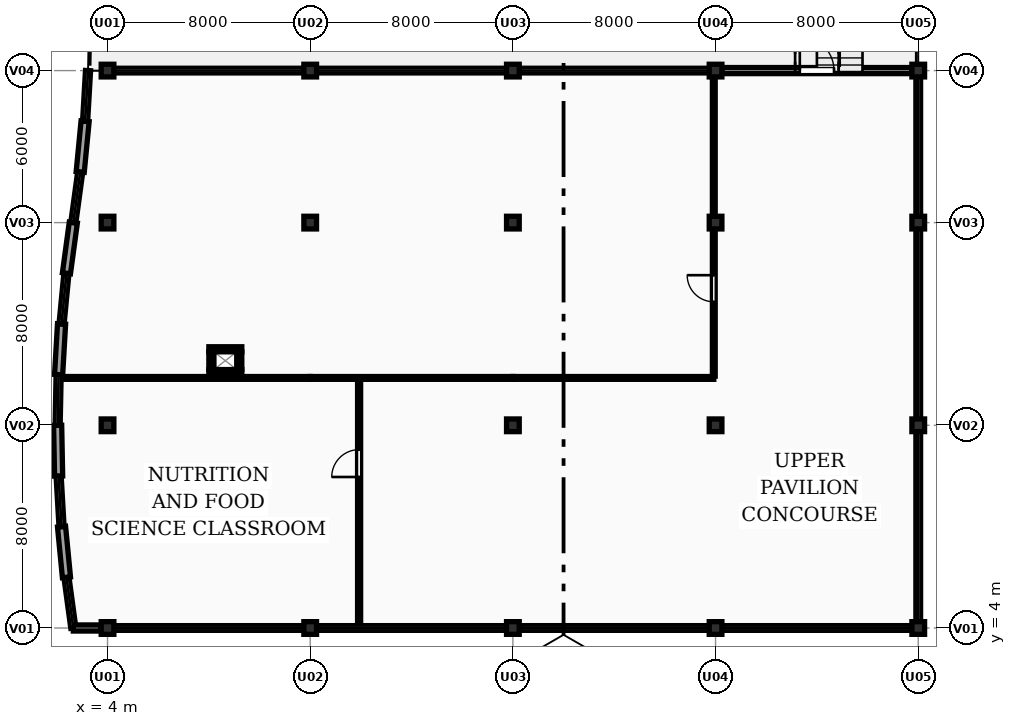
"""IFC4 building model, lengths in metres.
Left out: names, types, materials, properties, quantities, classifications, styles, units other than length and angle.
Written with IfcOpenShell. Run it as: python <this file> out.ifc"""

import sys

from ifc_helpers import new_model, si_unit, direction, frame, frame_2d, origin, origin_2d, place, context, subcontext, project, spatial, rectangle, extrude, element, fill, save


model = new_model("IFC4")
c1 = context("Model", 3, precision=1e-05, world=origin(), true_north=direction((0.0, 1.0)))
c2 = subcontext(c1, "Body", "Model", "MODEL_VIEW")
j1 = project(units=[si_unit("LENGTHUNIT", "METRE"), si_unit("PLANEANGLEUNIT", "RADIAN")], contexts=[c1])
p1 = place(None, origin())
s1 = spatial("IfcSite", under=j1, at=p1, CompositionType="ELEMENT")
p2 = place(p1, origin())
s2 = spatial("IfcBuilding", under=s1, at=p2, CompositionType="ELEMENT")
p3 = place(p2, frame((0.0, 0.0, 4.5)))
s3 = spatial("IfcBuildingStorey", under=s2, at=p3, CompositionType="ELEMENT", Elevation=4.5)
for number, where, z_axis, x_axis in (
    (1, (4.0, 4.0, 0.0), (0.0, 0.0, 1.0), (1.0, 0.0, 0.0)),
    (2, (4.0, 12.0, 0.0), (0.0, 0.0, 1.0), (1.0, 0.0, 0.0)),
    (3, (4.0, 20.0, 0.0), (0.0, 0.0, 1.0), (1.0, 0.0, 0.0)),
    (4, (4.0, 26.0, 0.0), (0.0, 0.0, 1.0), (1.0, 0.0, 0.0)),
    (5, (12.0, 4.0, 0.0), (0.0, 0.0, 1.0), (1.0, 0.0, 0.0)),
    (6, (12.0, 20.0, 0.0), (0.0, 0.0, 1.0), (1.0, 0.0, 0.0)),
    (7, (12.0, 26.0, 0.0), (0.0, 0.0, 1.0), (1.0, 0.0, 0.0)),
    (8, (20.0, 4.0, 0.0), (0.0, 0.0, 1.0), (1.0, 0.0, 0.0)),
    (9, (20.0, 12.0, 0.0), (0.0, 0.0, 1.0), (1.0, 0.0, 0.0)),
    (10, (20.0, 20.0, 0.0), (0.0, 0.0, 1.0), (1.0, 0.0, 0.0)),
    (11, (20.0, 26.0, 0.0), (0.0, 0.0, 1.0), (1.0, 0.0, 0.0)),
    (12, (28.0, 4.0, 0.0), (0.0, 0.0, 1.0), (1.0, 0.0, 0.0)),
    (13, (28.0, 12.0, 0.0), (0.0, 0.0, 1.0), (1.0, 0.0, 0.0)),
    (14, (28.0, 20.0, 0.0), (0.0, 0.0, 1.0), (1.0, 0.0, 0.0)),
    (15, (28.0, 26.0, 0.0), (0.0, 0.0, 1.0), (1.0, 0.0, 0.0)),
    (16, (36.0, 4.0, 0.0), (0.0, 0.0, 1.0), (1.0, 0.0, 0.0)),
    (17, (36.0, 12.0, 0.0), (0.0, 0.0, 1.0), (1.0, 0.0, 0.0)),
    (18, (36.0, 20.0, 0.0), (0.0, 0.0, 1.0), (1.0, 0.0, 0.0)),
    (19, (36.0, 26.0, 0.0), (0.0, 0.0, 1.0), (1.0, 0.0, 0.0)),
):
    element("IfcColumn", number, at=place(p3, frame(where, z_axis=z_axis, x_axis=x_axis)), inside=s3, PredefinedType="COLUMN", context=c2, shape_type="SweptSolid", body=[
        extrude(rectangle(XDim=0.5, YDim=0.5, at=origin_2d()), origin(), (0.0, 0.0, 1.0), 3.9),
    ])
p4 = place(p3, frame((2.65, 4.0, 0.0), z_axis=(0.0, 0.0, 1.0), x_axis=(-0.134627389588, 0.990896294257, 0.0)))
e20 = element("IfcWall", 20, at=p4, inside=s3, PredefinedType="SOLIDWALL", context=c2, shape_type="SweptSolid", body=[
    extrude(rectangle(XDim=2.018, YDim=0.2, at=frame_2d((1.009, 0.0))), origin(), (0.0, 0.0, 1.0), 0.95),
])
p5 = place(p3, frame((2.378, 6.0, 0.0), z_axis=(0.0, 0.0, 1.0), x_axis=(-0.096110619057, 0.995370659053, 0.0)))
e21 = element("IfcWall", 21, at=p5, inside=s3, PredefinedType="SOLIDWALL", context=c2, shape_type="SweptSolid", body=[
    extrude(rectangle(XDim=2.009, YDim=0.32, at=frame_2d((1.005, 0.0))), origin(), (0.0, 0.0, 1.0), 3.65),
])
p6 = place(p3, frame((2.185, 8.0, 0.0), z_axis=(0.0, 0.0, 1.0), x_axis=(-0.05776471272, 0.998330224908, 0.0)))
e22 = element("IfcWall", 22, at=p6, inside=s3, PredefinedType="SOLIDWALL", context=c2, shape_type="SweptSolid", body=[
    extrude(rectangle(XDim=2.003, YDim=0.2, at=frame_2d((1.002, 0.0))), origin(), (0.0, 0.0, 1.0), 0.95),
])
p7 = place(p3, frame((2.069, 10.0, 0.0), z_axis=(0.0, 0.0, 1.0), x_axis=(-0.019161520385, 0.999816401214, 0.0)))
e23 = element("IfcWall", 23, at=p7, inside=s3, PredefinedType="SOLIDWALL", context=c2, shape_type="SweptSolid", body=[
    extrude(rectangle(XDim=2.0, YDim=0.32, at=frame_2d((1.0, 0.0))), origin(), (0.0, 0.0, 1.0), 3.65),
])
p8 = place(p3, frame((2.031, 12.0, 0.0), z_axis=(0.0, 0.0, 1.0), x_axis=(0.019161520385, 0.999816401214, 0.0)))
e24 = element("IfcWall", 24, at=p8, inside=s3, PredefinedType="SOLIDWALL", context=c2, shape_type="SweptSolid", body=[
    extrude(rectangle(XDim=2.0, YDim=0.2, at=frame_2d((1.0, 0.0))), origin(), (0.0, 0.0, 1.0), 0.95),
])
p9 = place(p3, frame((2.069, 14.0, 0.0), z_axis=(0.0, 0.0, 1.0), x_axis=(0.05776471272, 0.998330224908, 0.0)))
e25 = element("IfcWall", 25, at=p9, inside=s3, PredefinedType="SOLIDWALL", context=c2, shape_type="SweptSolid", body=[
    extrude(rectangle(XDim=2.003, YDim=0.32, at=frame_2d((1.002, 0.0))), origin(), (0.0, 0.0, 1.0), 3.65),
])
p10 = place(p3, frame((2.185, 16.0, 0.0), z_axis=(0.0, 0.0, 1.0), x_axis=(0.096110619057, 0.995370659053, 0.0)))
e26 = element("IfcWall", 26, at=p10, inside=s3, PredefinedType="SOLIDWALL", context=c2, shape_type="SweptSolid", body=[
    extrude(rectangle(XDim=2.009, YDim=0.2, at=frame_2d((1.005, 0.0))), origin(), (0.0, 0.0, 1.0), 0.95),
])
p11 = place(p3, frame((2.378, 18.0, 0.0), z_axis=(0.0, 0.0, 1.0), x_axis=(0.134627389588, 0.990896294257, 0.0)))
e27 = element("IfcWall", 27, at=p11, inside=s3, PredefinedType="SOLIDWALL", context=c2, shape_type="SweptSolid", body=[
    extrude(rectangle(XDim=2.018, YDim=0.32, at=frame_2d((1.009, 0.0))), origin(), (0.0, 0.0, 1.0), 3.65),
])
p12 = place(p3, frame((2.65, 20.0, 0.0), z_axis=(0.0, 0.0, 1.0), x_axis=(0.134746153381, 0.990880151254, 0.0)))
e28 = element("IfcWall", 28, at=p12, inside=s3, PredefinedType="SOLIDWALL", context=c2, shape_type="SweptSolid", body=[
    extrude(rectangle(XDim=2.018, YDim=0.2, at=frame_2d((1.009, 0.0))), origin(), (0.0, 0.0, 1.0), 0.95),
])
p13 = place(p3, frame((2.922, 22.0, 0.0), z_axis=(0.0, 0.0, 1.0), x_axis=(0.096110619057, 0.995370659053, 0.0)))
e29 = element("IfcWall", 29, at=p13, inside=s3, PredefinedType="SOLIDWALL", context=c2, shape_type="SweptSolid", body=[
    extrude(rectangle(XDim=2.009, YDim=0.32, at=frame_2d((1.005, 0.0))), origin(), (0.0, 0.0, 1.0), 3.65),
])
p14 = place(p3, frame((3.115, 24.0, 0.0), z_axis=(0.0, 0.0, 1.0), x_axis=(0.05776471272, 0.998330224908, 0.0)))
e30 = element("IfcWall", 30, at=p14, inside=s3, PredefinedType="SOLIDWALL", context=c2, shape_type="SweptSolid", body=[
    extrude(rectangle(XDim=2.003, YDim=0.2, at=frame_2d((1.002, 0.0))), origin(), (0.0, 0.0, 1.0), 0.95),
])
for number, where, z_axis, x_axis in (
    (31, (35.75, 4.0, 0.0), (0.0, 0.0, 1.0), (-1.0, 0.0, 0.0)),
    (32, (27.75, 4.0, 0.0), (0.0, 0.0, 1.0), (-1.0, 0.0, 0.0)),
    (33, (19.75, 4.0, 0.0), (0.0, 0.0, 1.0), (-1.0, 0.0, 0.0)),
    (34, (11.75, 4.0, 0.0), (0.0, 0.0, 1.0), (-1.0, 0.0, 0.0)),
):
    element("IfcWall", number, at=place(p3, frame(where, z_axis=z_axis, x_axis=x_axis)), inside=s3, PredefinedType="SOLIDWALL", context=c2, shape_type="SweptSolid", body=[
        extrude(rectangle(XDim=7.5, YDim=0.185, at=frame_2d((3.75, 0.0))), origin(), (0.0, 0.0, 1.0), 0.95),
    ])
p15 = place(p3, frame((3.75, 4.0, 0.0), z_axis=(0.0, 0.0, 1.0), x_axis=(-1.0, 0.0, 0.0)))
e35 = element("IfcWall", 35, at=p15, inside=s3, PredefinedType="SOLIDWALL", context=c2, shape_type="SweptSolid", body=[
    extrude(rectangle(XDim=1.1, YDim=0.24, at=frame_2d((0.55, 0.0))), origin(), (0.0, 0.0, 1.0), 3.0),
])
p16 = place(p3, frame((36.0, 25.75, 0.0), z_axis=(0.0, 0.0, 1.0), x_axis=(0.0, -1.0, 0.0)))
e36 = element("IfcWall", 36, at=p16, inside=s3, PredefinedType="SOLIDWALL", context=c2, shape_type="SweptSolid", body=[
    extrude(rectangle(XDim=5.5, YDim=0.185, at=frame_2d((2.75, 0.0))), origin(), (0.0, 0.0, 1.0), 0.95),
])
for number, where, z_axis, x_axis in (
    (37, (36.0, 19.75, 0.0), (0.0, 0.0, 1.0), (0.0, -1.0, 0.0)),
    (38, (36.0, 11.75, 0.0), (0.0, 0.0, 1.0), (0.0, -1.0, 0.0)),
    (39, (4.25, 26.0, 0.0), (0.0, 0.0, 1.0), (1.0, 0.0, 0.0)),
    (40, (12.25, 26.0, 0.0), (0.0, 0.0, 1.0), (1.0, 0.0, 0.0)),
    (41, (20.25, 26.0, 0.0), (0.0, 0.0, 1.0), (1.0, 0.0, 0.0)),
):
    element("IfcWall", number, at=place(p3, frame(where, z_axis=z_axis, x_axis=x_axis)), inside=s3, PredefinedType="SOLIDWALL", context=c2, shape_type="SweptSolid", body=[
        extrude(rectangle(XDim=7.5, YDim=0.185, at=frame_2d((3.75, 0.0))), origin(), (0.0, 0.0, 1.0), 0.95),
    ])
p17 = place(p3, frame((28.25, 26.0, 0.0), z_axis=(0.0, 0.0, 1.0), x_axis=(1.0, 0.0, 0.0)))
e42 = element("IfcWall", 42, at=p17, inside=s3, PredefinedType="SOLIDWALL", context=c2, shape_type="SweptSolid", body=[
    extrude(rectangle(XDim=7.5, YDim=0.24, at=frame_2d((3.75, 0.0))), origin(), (0.0, 0.0, 1.0), 3.65),
])
p18 = place(p17, frame((3.075, 0.0, 0.0)))
e43 = element("IfcOpeningElement", 43, at=p18, cuts=e42, PredefinedType="OPENING", context=c2, shape_type="SweptSolid", body=[
    extrude(rectangle(XDim=1.35, YDim=2.15, at=frame_2d((0.675, 1.075))), frame((0.0, 0.13, 0.0), z_axis=(0.0, -1.0, 0.0), x_axis=(1.0, 0.0, 0.0)), (0.0, 0.0, 1.0), 0.26),
])
for number, where, z_axis, x_axis in (
    (44, (9.3, 14.1, 0.0), (0.0, 0.0, 1.0), (-1.0, 0.0, 0.0)),
    (45, (8.0, 15.0, 0.0), (0.0, 0.0, 1.0), (1.0, 0.0, 0.0)),
):
    element("IfcWall", number, at=place(p3, frame(where, z_axis=z_axis, x_axis=x_axis)), inside=s3, PredefinedType="PARTITIONING", context=c2, shape_type="SweptSolid", body=[
        extrude(rectangle(XDim=1.3, YDim=0.2, at=frame_2d((0.65, 0.0))), origin(), (0.0, 0.0, 1.0), 3.65),
    ])
for number, where, z_axis, x_axis in (
    (46, (8.1, 14.2, 0.0), (0.0, 0.0, 1.0), (0.0, 1.0, 0.0)),
    (47, (9.2, 14.9, 0.0), (0.0, 0.0, 1.0), (0.0, -1.0, 0.0)),
):
    element("IfcWall", number, at=place(p3, frame(where, z_axis=z_axis, x_axis=x_axis)), inside=s3, PredefinedType="PARTITIONING", context=c2, shape_type="SweptSolid", body=[
        extrude(rectangle(XDim=0.7, YDim=0.2, at=frame_2d((0.35, 0.0))), origin(), (0.0, 0.0, 1.0), 3.65),
    ])
p19 = place(p3, frame((2.264, 13.87, 0.0), z_axis=(0.0, 0.0, 1.0), x_axis=(1.0, 0.0, 0.0)))
e48 = element("IfcWall", 48, at=p19, inside=s3, PredefinedType="PARTITIONING", context=c2, shape_type="SweptSolid", body=[
    extrude(rectangle(XDim=9.736, YDim=0.11, at=frame_2d((4.868, 0.0))), origin(), (0.0, 0.0, 1.0), 3.65),
])
p20 = place(p3, frame((12.0, 13.87, 0.0), z_axis=(0.0, 0.0, 1.0), x_axis=(1.0, 0.0, 0.0)))
e49 = element("IfcWall", 49, at=p20, inside=s3, PredefinedType="PARTITIONING", context=c2, shape_type="SweptSolid", body=[
    extrude(rectangle(XDim=8.0, YDim=0.11, at=frame_2d((4.0, 0.0))), origin(), (0.0, 0.0, 1.0), 3.65),
])
p21 = place(p3, frame((20.0, 13.87, 0.0), z_axis=(0.0, 0.0, 1.0), x_axis=(1.0, 0.0, 0.0)))
e50 = element("IfcWall", 50, at=p21, inside=s3, PredefinedType="PARTITIONING", context=c2, shape_type="SweptSolid", body=[
    extrude(rectangle(XDim=7.93, YDim=0.11, at=frame_2d((3.965, 0.0))), origin(), (0.0, 0.0, 1.0), 3.65),
])
p22 = place(p3, frame((27.93, 13.94, 0.0), z_axis=(0.0, 0.0, 1.0), x_axis=(0.0, 1.0, 0.0)))
e51 = element("IfcWall", 51, at=p22, inside=s3, PredefinedType="PARTITIONING", context=c2, shape_type="SweptSolid", body=[
    extrude(rectangle(XDim=11.79, YDim=0.11, at=frame_2d((5.895, 0.0))), origin(), (0.0, 0.0, 1.0), 2.998),
])
p23 = place(p22, frame((2.935, 0.0, 0.0)))
e52 = element("IfcOpeningElement", 52, at=p23, cuts=e51, PredefinedType="OPENING", context=c2, shape_type="SweptSolid", body=[
    extrude(rectangle(XDim=1.05, YDim=2.1, at=frame_2d((0.525, 1.05))), frame((0.0, 0.065, 0.0), z_axis=(0.0, -1.0, 0.0), x_axis=(1.0, 0.0, 0.0)), (0.0, 0.0, 1.0), 0.13),
])
p24 = place(p3, frame((13.93, 4.135, 0.0), z_axis=(0.0, 0.0, 1.0), x_axis=(0.0, 1.0, 0.0)))
e53 = element("IfcWall", 53, at=p24, inside=s3, PredefinedType="PARTITIONING", context=c2, shape_type="SweptSolid", body=[
    extrude(rectangle(XDim=9.595, YDim=0.12, at=frame_2d((4.798, 0.0))), origin(), (0.0, 0.0, 1.0), 3.65),
])
p25 = place(p24, frame((5.825, 0.0, 0.0)))
e54 = element("IfcOpeningElement", 54, at=p25, cuts=e53, PredefinedType="OPENING", context=c2, shape_type="SweptSolid", body=[
    extrude(rectangle(XDim=1.08, YDim=2.15, at=frame_2d((0.54, 1.075))), frame((0.0, 0.07, 0.0), z_axis=(0.0, -1.0, 0.0), x_axis=(1.0, 0.0, 0.0)), (0.0, 0.0, 1.0), 0.14),
])
p26 = place(p18, origin())
e55 = element("IfcDoor", 55, at=p26, inside=s3, OperationType="SINGLE_SWING_LEFT", PredefinedType="DOOR", context=c2, shape_type="SweptSolid", body=[
    extrude(rectangle(XDim=1.35, YDim=2.15, at=frame_2d((0.675, 1.075))), frame((0.0, 0.025, 0.0), z_axis=(0.0, -1.0, 0.0), x_axis=(1.0, 0.0, 0.0)), (0.0, 0.0, 1.0), 0.05),
])
fill(e43, e55)
p27 = place(p23, origin())
e56 = element("IfcDoor", 56, at=p27, inside=s3, OperationType="SINGLE_SWING_RIGHT", PredefinedType="DOOR", context=c2, shape_type="SweptSolid", body=[
    extrude(rectangle(XDim=1.05, YDim=2.1, at=frame_2d((0.525, 1.05))), frame((0.0, 0.025, 0.0), z_axis=(0.0, -1.0, 0.0), x_axis=(1.0, 0.0, 0.0)), (0.0, 0.0, 1.0), 0.05),
])
fill(e52, e56)
p28 = place(p25, origin())
e57 = element("IfcDoor", 57, at=p28, inside=s3, OperationType="SINGLE_SWING_LEFT", PredefinedType="DOOR", context=c2, shape_type="SweptSolid", body=[
    extrude(rectangle(XDim=1.08, YDim=2.15, at=frame_2d((0.54, 1.075))), frame((0.0, 0.025, 0.0), z_axis=(0.0, -1.0, 0.0), x_axis=(1.0, 0.0, 0.0)), (0.0, 0.0, 1.0), 0.05),
])
fill(e54, e57)
save(model, sys.argv[1])
